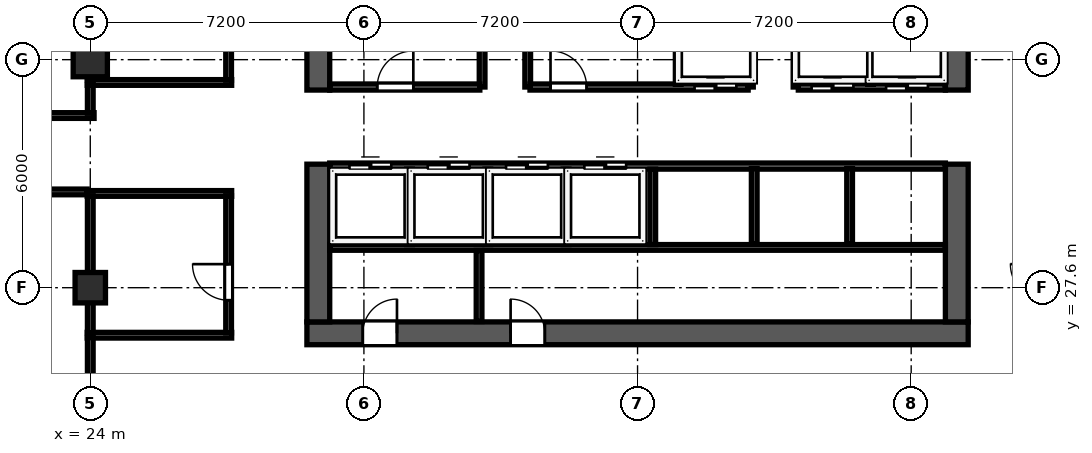
"""IFC4 building model, lengths in metres.
Left out: names, types, materials, properties, quantities, classifications, styles, units other than length and angle.
Written with IfcOpenShell. Run it as: python <this file> out.ifc"""

import sys

from ifc_helpers import new_model, si_unit, direction, frame, frame_2d, origin, origin_2d, place, context, subcontext, project, spatial, rectangle, hollow_rectangle, extrude, element, fill, save


model = new_model("IFC4")
c1 = context("Model", 3, precision=1e-05, world=origin(), true_north=direction((0.0, 1.0)))
c2 = subcontext(c1, "Body", "Model", "MODEL_VIEW")
j1 = project(units=[si_unit("LENGTHUNIT", "METRE"), si_unit("PLANEANGLEUNIT", "RADIAN")], contexts=[c1])
p1 = place(None, origin())
s1 = spatial("IfcSite", under=j1, at=p1, CompositionType="ELEMENT")
p2 = place(p1, origin())
s2 = spatial("IfcBuilding", under=s1, at=p2, CompositionType="ELEMENT")
p3 = place(p2, frame((0.0, 0.0, 169.0)))
s3 = spatial("IfcBuildingStorey", under=s2, at=p3, CompositionType="ELEMENT", Elevation=169.0)
p4 = place(p3, frame((29.7, 26.4, 0.0), z_axis=(0.0, 0.0, 1.0), x_axis=(1.0, 0.0, 0.0)))
e1 = element("IfcWall", 1, at=p4, inside=s3, PredefinedType="SHEAR", context=c2, shape_type="SweptSolid", body=[
    extrude(rectangle(XDim=17.4, YDim=0.6, at=frame_2d((8.7, 0.0))), origin(), (0.0, 0.0, 1.0), 3.62),
])
p5 = place(p4, frame((2.37, 0.0, 0.0), z_axis=(0.0, 0.0, 1.0), x_axis=(-1.0, 0.0, 0.0)))
e2 = element("IfcOpeningElement", 2, at=p5, cuts=e1, PredefinedType="OPENING", context=c2, shape_type="SweptSolid", body=[
    extrude(rectangle(XDim=0.9, YDim=2.1, at=frame_2d((0.45, 1.05))), frame((0.0, 0.31, 0.0), z_axis=(0.0, -1.0, 0.0), x_axis=(1.0, 0.0, 0.0)), (0.0, 0.0, 1.0), 0.62),
])
p6 = place(p4, frame((6.26, 0.0, 0.0), z_axis=(0.0, 0.0, 1.0), x_axis=(-1.0, 0.0, 0.0)))
e3 = element("IfcOpeningElement", 3, at=p6, cuts=e1, PredefinedType="OPENING", context=c2, shape_type="SweptSolid", body=[
    extrude(rectangle(XDim=0.9, YDim=2.1, at=frame_2d((0.45, 1.05))), frame((0.0, 0.31, 0.0), z_axis=(0.0, -1.0, 0.0), x_axis=(1.0, 0.0, 0.0)), (0.0, 0.0, 1.0), 0.62),
])
p7 = place(p3, frame((30.0, 26.7, 0.0), z_axis=(0.0, 0.0, 1.0), x_axis=(0.0, 1.0, 0.0)))
e4 = element("IfcWall", 4, at=p7, inside=s3, PredefinedType="SHEAR", context=c2, shape_type="SweptSolid", body=[
    extrude(rectangle(XDim=4.15, YDim=0.6, at=frame_2d((2.075, 0.0))), origin(), (0.0, 0.0, 1.0), 3.62),
])
p8 = place(p3, frame((30.0, 32.8, 0.0), z_axis=(0.0, 0.0, 1.0), x_axis=(0.0, 1.0, 0.0)))
e5 = element("IfcWall", 5, at=p8, inside=s3, PredefinedType="SHEAR", context=c2, shape_type="SweptSolid", body=[
    extrude(rectangle(XDim=10.1, YDim=0.6, at=frame_2d((5.05, 0.0))), origin(), (0.0, 0.0, 1.0), 3.62),
])
p9 = place(p3, frame((46.8, 26.7, 0.0), z_axis=(0.0, 0.0, 1.0), x_axis=(0.0, 1.0, 0.0)))
e6 = element("IfcWall", 6, at=p9, inside=s3, PredefinedType="SHEAR", context=c2, shape_type="SweptSolid", body=[
    extrude(rectangle(XDim=4.15, YDim=0.6, at=frame_2d((2.075, 0.0))), origin(), (0.0, 0.0, 1.0), 3.62),
])
p10 = place(p3, frame((46.8, 32.8, 0.0), z_axis=(0.0, 0.0, 1.0), x_axis=(0.0, 1.0, 0.0)))
e7 = element("IfcWall", 7, at=p10, inside=s3, PredefinedType="SHEAR", context=c2, shape_type="SweptSolid", body=[
    extrude(rectangle(XDim=10.1, YDim=0.6, at=frame_2d((5.05, 0.0))), origin(), (0.0, 0.0, 1.0), 3.62),
])
p11 = place(p3, frame((24.0, 33.6, 0.0), z_axis=(0.0, 0.0, 1.0), x_axis=(1.0, 0.0, 0.0)))
e8 = element("IfcColumn", 8, at=p11, inside=s3, PredefinedType="COLUMN", context=c2, shape_type="SweptSolid", body=[
    extrude(hollow_rectangle(XDim=0.9, YDim=0.9, WallThickness=0.034, at=origin_2d()), origin(), (0.0, 0.0, 1.0), 3.8),
])
p12 = place(p3, frame((24.0, 27.6, 0.0), z_axis=(0.0, 0.0, 1.0), x_axis=(1.0, 0.0, 0.0)))
e9 = element("IfcColumn", 9, at=p12, inside=s3, PredefinedType="COLUMN", context=c2, shape_type="SweptSolid", body=[
    extrude(hollow_rectangle(XDim=0.8, YDim=0.8, WallThickness=0.03, at=origin_2d()), origin(), (0.0, 0.0, 1.0), 3.8),
])
for number, where, z_axis, x_axis in (
    (10, (34.31, 32.88, 0.0), (0.0, 0.0, 1.0), (0.0, 1.0, 0.0)),
    (11, (35.51, 32.88, 0.0), (0.0, 0.0, 1.0), (0.0, 1.0, 0.0)),
    (12, (41.37, 32.88, 0.0), (0.0, 0.0, 1.0), (0.0, 1.0, 0.0)),
    (13, (42.57, 32.88, 0.0), (0.0, 0.0, 1.0), (0.0, 1.0, 0.0)),
):
    element("IfcWall", number, at=place(p3, frame(where, z_axis=z_axis, x_axis=x_axis)), inside=s3, PredefinedType="SOLIDWALL", context=c2, shape_type="SweptSolid", body=[
        extrude(rectangle(XDim=2.17, YDim=0.15, at=frame_2d((1.085, 0.0))), origin(), (0.0, 0.0, 1.0), 3.62),
    ])
p13 = place(p3, frame((30.3, 32.88, 0.0), z_axis=(0.0, 0.0, 1.0), x_axis=(1.0, 0.0, 0.0)))
e14 = element("IfcWall", 14, at=p13, inside=s3, PredefinedType="SOLIDWALL", context=c2, shape_type="SweptSolid", body=[
    extrude(rectangle(XDim=3.95, YDim=0.16, at=frame_2d((1.975, 0.0))), origin(), (0.0, 0.0, 1.0), 3.62),
])
p14 = place(p13, frame((2.2, 0.0, 0.0), z_axis=(0.0, 0.0, 1.0), x_axis=(-1.0, 0.0, 0.0)))
e15 = element("IfcOpeningElement", 15, at=p14, cuts=e14, PredefinedType="OPENING", context=c2, shape_type="SweptSolid", body=[
    extrude(rectangle(XDim=0.95, YDim=2.12, at=frame_2d((0.475, 1.06))), frame((0.0, 0.09, 0.0), z_axis=(0.0, -1.0, 0.0), x_axis=(1.0, 0.0, 0.0)), (0.0, 0.0, 1.0), 0.18),
])
p15 = place(p3, frame((35.57, 32.88, 0.0), z_axis=(0.0, 0.0, 1.0), x_axis=(1.0, 0.0, 0.0)))
e16 = element("IfcWall", 16, at=p15, inside=s3, PredefinedType="SOLIDWALL", context=c2, shape_type="SweptSolid", body=[
    extrude(rectangle(XDim=5.74, YDim=0.16, at=frame_2d((2.87, 0.0))), origin(), (0.0, 0.0, 1.0), 3.62),
])
p16 = place(p15, frame((1.49, 0.0, 0.0), z_axis=(0.0, 0.0, 1.0), x_axis=(-1.0, 0.0, 0.0)))
e17 = element("IfcOpeningElement", 17, at=p16, cuts=e16, PredefinedType="OPENING", context=c2, shape_type="SweptSolid", body=[
    extrude(rectangle(XDim=0.95, YDim=2.12, at=frame_2d((0.475, 1.06))), frame((0.0, 0.09, 0.0), z_axis=(0.0, -1.0, 0.0), x_axis=(1.0, 0.0, 0.0)), (0.0, 0.0, 1.0), 0.18),
])
p17 = place(p15, frame((5.43, 0.0, 0.0), z_axis=(0.0, 0.0, 1.0), x_axis=(-1.0, 0.0, 0.0)))
e18 = element("IfcOpeningElement", 18, at=p17, cuts=e16, PredefinedType="OPENING", context=c2, shape_type="SweptSolid", body=[
    extrude(rectangle(XDim=1.1, YDim=2.2, at=frame_2d((0.55, 1.1))), frame((0.0, 0.09, 0.0), z_axis=(0.0, -1.0, 0.0), x_axis=(1.0, 0.0, 0.0)), (0.0, 0.0, 1.0), 0.18),
])
p18 = place(p3, frame((42.63, 32.88, 0.0), z_axis=(0.0, 0.0, 1.0), x_axis=(1.0, 0.0, 0.0)))
e19 = element("IfcWall", 19, at=p18, inside=s3, PredefinedType="SOLIDWALL", context=c2, shape_type="SweptSolid", body=[
    extrude(rectangle(XDim=3.87, YDim=0.16, at=frame_2d((1.935, 0.0))), origin(), (0.0, 0.0, 1.0), 3.62),
])
p19 = place(p18, frame((1.45, 0.0, 0.0), z_axis=(0.0, 0.0, 1.0), x_axis=(-1.0, 0.0, 0.0)))
e20 = element("IfcOpeningElement", 20, at=p19, cuts=e19, PredefinedType="OPENING", context=c2, shape_type="SweptSolid", body=[
    extrude(rectangle(XDim=1.1, YDim=2.2, at=frame_2d((0.55, 1.1))), frame((0.0, 0.09, 0.0), z_axis=(0.0, -1.0, 0.0), x_axis=(1.0, 0.0, 0.0)), (0.0, 0.0, 1.0), 0.18),
])
p20 = place(p18, frame((3.41, 0.0, 0.0), z_axis=(0.0, 0.0, 1.0), x_axis=(-1.0, 0.0, 0.0)))
e21 = element("IfcOpeningElement", 21, at=p20, cuts=e19, PredefinedType="OPENING", context=c2, shape_type="SweptSolid", body=[
    extrude(rectangle(XDim=1.1, YDim=2.2, at=frame_2d((0.55, 1.1))), frame((0.0, 0.09, 0.0), z_axis=(0.0, -1.0, 0.0), x_axis=(1.0, 0.0, 0.0)), (0.0, 0.0, 1.0), 0.18),
])
for number, where, z_axis, x_axis in (
    (22, (39.47, 32.95, 0.0), (0.0, 0.0, 1.0), (0.0, 1.0, 0.0)),
    (23, (44.53, 32.95, 0.0), (0.0, 0.0, 1.0), (0.0, 1.0, 0.0)),
):
    element("IfcWall", number, at=place(p3, frame(where, z_axis=z_axis, x_axis=x_axis)), inside=s3, PredefinedType="SOLIDWALL", context=c2, shape_type="SweptSolid", body=[
        extrude(rectangle(XDim=2.05, YDim=0.15, at=frame_2d((1.025, 0.0))), origin(), (0.0, 0.0, 1.0), 3.62),
    ])
p21 = place(p3, frame((30.3, 30.8, 0.0), z_axis=(0.0, 0.0, 1.0), x_axis=(1.0, 0.0, 0.0)))
e24 = element("IfcWall", 24, at=p21, inside=s3, PredefinedType="SOLIDWALL", context=c2, shape_type="SweptSolid", body=[
    extrude(rectangle(XDim=16.2, YDim=0.16, at=frame_2d((8.1, 0.0))), origin(), (0.0, 0.0, 1.0), 3.62),
])
p22 = place(p21, frame((0.52, 0.0, 0.0)))
e25 = element("IfcOpeningElement", 25, at=p22, cuts=e24, PredefinedType="OPENING", context=c2, shape_type="SweptSolid", body=[
    extrude(rectangle(XDim=1.1, YDim=2.2, at=frame_2d((0.55, 1.1))), frame((0.0, 0.09, 0.0), z_axis=(0.0, -1.0, 0.0), x_axis=(1.0, 0.0, 0.0)), (0.0, 0.0, 1.0), 0.18),
])
p23 = place(p21, frame((2.58, 0.0, 0.0)))
e26 = element("IfcOpeningElement", 26, at=p23, cuts=e24, PredefinedType="OPENING", context=c2, shape_type="SweptSolid", body=[
    extrude(rectangle(XDim=1.1, YDim=2.2, at=frame_2d((0.55, 1.1))), frame((0.0, 0.09, 0.0), z_axis=(0.0, -1.0, 0.0), x_axis=(1.0, 0.0, 0.0)), (0.0, 0.0, 1.0), 0.18),
])
p24 = place(p21, frame((4.64, 0.0, 0.0)))
e27 = element("IfcOpeningElement", 27, at=p24, cuts=e24, PredefinedType="OPENING", context=c2, shape_type="SweptSolid", body=[
    extrude(rectangle(XDim=1.1, YDim=2.2, at=frame_2d((0.55, 1.1))), frame((0.0, 0.09, 0.0), z_axis=(0.0, -1.0, 0.0), x_axis=(1.0, 0.0, 0.0)), (0.0, 0.0, 1.0), 0.18),
])
p25 = place(p21, frame((6.7, 0.0, 0.0)))
e28 = element("IfcOpeningElement", 28, at=p25, cuts=e24, PredefinedType="OPENING", context=c2, shape_type="SweptSolid", body=[
    extrude(rectangle(XDim=1.1, YDim=2.2, at=frame_2d((0.55, 1.1))), frame((0.0, 0.09, 0.0), z_axis=(0.0, -1.0, 0.0), x_axis=(1.0, 0.0, 0.0)), (0.0, 0.0, 1.0), 0.18),
])
p26 = place(p3, frame((30.3, 28.66, 0.0), z_axis=(0.0, 0.0, 1.0), x_axis=(1.0, 0.0, 0.0)))
e29 = element("IfcWall", 29, at=p26, inside=s3, PredefinedType="PARTITIONING", context=c2, shape_type="SweptSolid", body=[
    extrude(rectangle(XDim=16.2, YDim=0.15, at=frame_2d((8.1, 0.0))), origin(), (0.0, 0.0, 1.0), 3.62),
])
for number, where, z_axis, x_axis in (
    (30, (32.4, 28.735, 0.0), (0.0, 0.0, 1.0), (0.0, 1.0, 0.0)),
    (31, (34.46, 28.735, 0.0), (0.0, 0.0, 1.0), (0.0, 1.0, 0.0)),
    (32, (36.52, 28.735, 0.0), (0.0, 0.0, 1.0), (0.0, 1.0, 0.0)),
    (33, (38.8, 28.735, 0.0), (0.0, 0.0, 1.0), (0.0, 1.0, 0.0)),
):
    element("IfcWall", number, at=place(p3, frame(where, z_axis=z_axis, x_axis=x_axis)), inside=s3, PredefinedType="SOLIDWALL", context=c2, shape_type="SweptSolid", body=[
        extrude(rectangle(XDim=1.985, YDim=0.15, at=frame_2d((0.992, 0.0))), origin(), (0.0, 0.0, 1.0), 3.62),
    ])
p27 = place(p3, frame((34.23, 26.71, 0.0), z_axis=(0.0, 0.0, 1.0), x_axis=(0.0, 1.0, 0.0)))
e34 = element("IfcWall", 34, at=p27, inside=s3, PredefinedType="PARTITIONING", context=c2, shape_type="SweptSolid", body=[
    extrude(rectangle(XDim=1.87, YDim=0.15, at=frame_2d((0.935, 0.0))), origin(), (0.0, 0.0, 1.0), 3.62),
])
for number, where, z_axis, x_axis in (
    (35, (41.47, 28.75, 0.0), (0.0, 0.0, 1.0), (0.0, 1.0, 0.0)),
    (36, (43.98, 28.75, 0.0), (0.0, 0.0, 1.0), (0.0, 1.0, 0.0)),
):
    element("IfcWall", number, at=place(p3, frame(where, z_axis=z_axis, x_axis=x_axis)), inside=s3, PredefinedType="SOLIDWALL", context=c2, shape_type="SweptSolid", body=[
        extrude(rectangle(XDim=1.985, YDim=0.15, at=frame_2d((0.993, 0.0))), origin(), (0.0, 0.0, 1.0), 3.62),
    ])
p28 = place(p3, frame((23.92, 33.0, 0.0), z_axis=(0.0, 0.0, 1.0), x_axis=(1.0, 0.0, 0.0)))
e37 = element("IfcWall", 37, at=p28, inside=s3, PredefinedType="PARTITIONING", context=c2, shape_type="SweptSolid", body=[
    extrude(rectangle(XDim=3.8, YDim=0.15, at=frame_2d((1.9, 0.0))), origin(), (0.0, 0.0, 1.0), 3.62),
])
p29 = place(p3, frame((24.0, 33.06, 0.0), z_axis=(0.0, 0.0, 1.0), x_axis=(0.0, 1.0, 0.0)))
e38 = element("IfcWall", 38, at=p29, inside=s3, PredefinedType="PARTITIONING", context=c2, shape_type="SweptSolid", body=[
    extrude(rectangle(XDim=5.08, YDim=0.15, at=frame_2d((2.54, 0.0))), origin(), (0.0, 0.0, 1.0), 3.215),
])
p30 = place(p3, frame((27.64, 33.06, 0.0), z_axis=(0.0, 0.0, 1.0), x_axis=(0.0, 1.0, 0.0)))
e39 = element("IfcWall", 39, at=p30, inside=s3, PredefinedType="PARTITIONING", context=c2, shape_type="SweptSolid", body=[
    extrude(rectangle(XDim=5.08, YDim=0.15, at=frame_2d((2.54, 0.0))), origin(), (0.0, 0.0, 1.0), 3.62),
])
p31 = place(p30, frame((2.41, 0.0, 0.0), z_axis=(0.0, 0.0, 1.0), x_axis=(-1.0, 0.0, 0.0)))
e40 = element("IfcOpeningElement", 40, at=p31, cuts=e39, PredefinedType="OPENING", context=c2, shape_type="SweptSolid", body=[
    extrude(rectangle(XDim=0.95, YDim=2.12, at=frame_2d((0.475, 1.06))), frame((0.0, 0.085, 0.0), z_axis=(0.0, -1.0, 0.0), x_axis=(1.0, 0.0, 0.0)), (0.0, 0.0, 1.0), 0.17),
])
for number, where, z_axis, x_axis in (
    (41, (23.92, 30.08, 0.0), (0.0, 0.0, 1.0), (1.0, 0.0, 0.0)),
    (42, (23.92, 26.35, 0.0), (0.0, 0.0, 1.0), (1.0, 0.0, 0.0)),
):
    element("IfcWall", number, at=place(p3, frame(where, z_axis=z_axis, x_axis=x_axis)), inside=s3, PredefinedType="PARTITIONING", context=c2, shape_type="SweptSolid", body=[
        extrude(rectangle(XDim=3.8, YDim=0.15, at=frame_2d((1.9, 0.0))), origin(), (0.0, 0.0, 1.0), 3.62),
    ])
p32 = place(p3, frame((24.0, 26.41, 0.0), z_axis=(0.0, 0.0, 1.0), x_axis=(0.0, 1.0, 0.0)))
e43 = element("IfcWall", 43, at=p32, inside=s3, PredefinedType="PARTITIONING", context=c2, shape_type="SweptSolid", body=[
    extrude(rectangle(XDim=3.61, YDim=0.15, at=frame_2d((1.805, 0.0))), origin(), (0.0, 0.0, 1.0), 3.215),
])
p33 = place(p3, frame((27.64, 26.41, 0.0), z_axis=(0.0, 0.0, 1.0), x_axis=(0.0, 1.0, 0.0)))
e44 = element("IfcWall", 44, at=p33, inside=s3, PredefinedType="PARTITIONING", context=c2, shape_type="SweptSolid", body=[
    extrude(rectangle(XDim=3.61, YDim=0.15, at=frame_2d((1.805, 0.0))), origin(), (0.0, 0.0, 1.0), 3.62),
])
p34 = place(p33, frame((1.81, 0.0, 0.0), z_axis=(0.0, 0.0, 1.0), x_axis=(-1.0, 0.0, 0.0)))
e45 = element("IfcOpeningElement", 45, at=p34, cuts=e44, PredefinedType="OPENING", context=c2, shape_type="SweptSolid", body=[
    extrude(rectangle(XDim=0.95, YDim=2.12, at=frame_2d((0.475, 1.06))), frame((0.0, 0.085, 0.0), z_axis=(0.0, -1.0, 0.0), x_axis=(1.0, 0.0, 0.0)), (0.0, 0.0, 1.0), 0.17),
])
p35 = place(p3, frame((18.312, 32.13, 0.0), z_axis=(0.0, 0.0, 1.0), x_axis=(1.0, 0.0, 0.0)))
e46 = element("IfcWall", 46, at=p35, inside=s3, PredefinedType="PARTITIONING", context=c2, shape_type="SweptSolid", body=[
    extrude(rectangle(XDim=5.788, YDim=0.15, at=frame_2d((2.894, 0.0))), origin(), (0.0, 0.0, 1.0), 3.62),
])
p36 = place(p35, frame((0.14, 0.0, 0.0)))
e47 = element("IfcOpeningElement", 47, at=p36, cuts=e46, PredefinedType="OPENING", context=c2, shape_type="SweptSolid", body=[
    extrude(rectangle(XDim=0.95, YDim=2.18, at=frame_2d((0.475, 1.09))), frame((0.0, 0.085, 0.0), z_axis=(0.0, -1.0, 0.0), x_axis=(1.0, 0.0, 0.0)), (0.0, 0.0, 1.0), 0.17),
])
p37 = place(p3, frame((24.0, 32.19, 0.0), z_axis=(0.0, 0.0, 1.0), x_axis=(0.0, 1.0, 0.0)))
e48 = element("IfcWall", 48, at=p37, inside=s3, PredefinedType="PARTITIONING", context=c2, shape_type="SweptSolid", body=[
    extrude(rectangle(XDim=0.75, YDim=0.15, at=frame_2d((0.375, 0.0))), origin(), (0.0, 0.0, 1.0), 3.215),
])
p38 = place(p3, frame((18.312, 30.12, 0.0), z_axis=(0.0, 0.0, 1.0), x_axis=(1.0, 0.0, 0.0)))
e49 = element("IfcWall", 49, at=p38, inside=s3, PredefinedType="PARTITIONING", context=c2, shape_type="SweptSolid", body=[
    extrude(rectangle(XDim=5.606, YDim=0.15, at=frame_2d((2.803, 0.0))), origin(), (0.0, 0.0, 1.0), 3.62),
])
p39 = place(p38, frame((1.09, 0.0, 0.0), z_axis=(0.0, 0.0, 1.0), x_axis=(-1.0, 0.0, 0.0)))
e50 = element("IfcOpeningElement", 50, at=p39, cuts=e49, PredefinedType="OPENING", context=c2, shape_type="SweptSolid", body=[
    extrude(rectangle(XDim=0.95, YDim=2.15, at=frame_2d((0.475, 1.075))), frame((0.0, 0.085, 0.0), z_axis=(0.0, -1.0, 0.0), x_axis=(1.0, 0.0, 0.0)), (0.0, 0.0, 1.0), 0.17),
])
p40 = place(p3, frame((24.0, 24.28, 0.0), z_axis=(0.0, 0.0, 1.0), x_axis=(0.0, 1.0, 0.0)))
e51 = element("IfcWall", 51, at=p40, inside=s3, PredefinedType="PARTITIONING", context=c2, shape_type="SweptSolid", body=[
    extrude(rectangle(XDim=2.01, YDim=0.15, at=frame_2d((1.005, 0.0))), origin(), (0.0, 0.0, 1.0), 3.215),
])
p41 = place(p14, origin())
e52 = element("IfcDoor", 52, at=p41, inside=s3, OperationType="SINGLE_SWING_LEFT", PredefinedType="DOOR", context=c2, shape_type="SweptSolid", body=[
    extrude(rectangle(XDim=0.95, YDim=2.12, at=frame_2d((0.475, 1.06))), frame((0.0, 0.025, 0.0), z_axis=(0.0, -1.0, 0.0), x_axis=(1.0, 0.0, 0.0)), (0.0, 0.0, 1.0), 0.05),
])
fill(e15, e52)
p42 = place(p16, origin())
e53 = element("IfcDoor", 53, at=p42, inside=s3, OperationType="SINGLE_SWING_RIGHT", PredefinedType="DOOR", context=c2, shape_type="SweptSolid", body=[
    extrude(rectangle(XDim=0.95, YDim=2.12, at=frame_2d((0.475, 1.06))), frame((0.0, 0.025, 0.0), z_axis=(0.0, -1.0, 0.0), x_axis=(1.0, 0.0, 0.0)), (0.0, 0.0, 1.0), 0.05),
])
fill(e17, e53)
p43 = place(p17, origin())
e54 = element("IfcDoor", 54, at=p43, inside=s3, OperationType="SLIDING_TO_RIGHT", PredefinedType="DOOR", context=c2, shape_type="SweptSolid", body=[
    extrude(rectangle(XDim=1.1, YDim=2.2, at=frame_2d((0.55, 1.1))), frame((0.0, 0.025, 0.0), z_axis=(0.0, -1.0, 0.0), x_axis=(1.0, 0.0, 0.0)), (0.0, 0.0, 1.0), 0.05),
])
fill(e18, e54)
p44 = place(p19, origin())
e55 = element("IfcDoor", 55, at=p44, inside=s3, OperationType="SLIDING_TO_RIGHT", PredefinedType="DOOR", context=c2, shape_type="SweptSolid", body=[
    extrude(rectangle(XDim=1.1, YDim=2.2, at=frame_2d((0.55, 1.1))), frame((0.0, 0.025, 0.0), z_axis=(0.0, -1.0, 0.0), x_axis=(1.0, 0.0, 0.0)), (0.0, 0.0, 1.0), 0.05),
])
fill(e20, e55)
p45 = place(p20, origin())
e56 = element("IfcDoor", 56, at=p45, inside=s3, OperationType="SLIDING_TO_RIGHT", PredefinedType="DOOR", context=c2, shape_type="SweptSolid", body=[
    extrude(rectangle(XDim=1.1, YDim=2.2, at=frame_2d((0.55, 1.1))), frame((0.0, 0.025, 0.0), z_axis=(0.0, -1.0, 0.0), x_axis=(1.0, 0.0, 0.0)), (0.0, 0.0, 1.0), 0.05),
])
fill(e21, e56)
p46 = place(p22, origin())
e57 = element("IfcDoor", 57, at=p46, inside=s3, OperationType="SLIDING_TO_LEFT", PredefinedType="DOOR", context=c2, shape_type="SweptSolid", body=[
    extrude(rectangle(XDim=1.1, YDim=2.2, at=frame_2d((0.55, 1.1))), frame((0.0, 0.025, 0.0), z_axis=(0.0, -1.0, 0.0), x_axis=(1.0, 0.0, 0.0)), (0.0, 0.0, 1.0), 0.05),
])
fill(e25, e57)
p47 = place(p23, origin())
e58 = element("IfcDoor", 58, at=p47, inside=s3, OperationType="SLIDING_TO_LEFT", PredefinedType="DOOR", context=c2, shape_type="SweptSolid", body=[
    extrude(rectangle(XDim=1.1, YDim=2.2, at=frame_2d((0.55, 1.1))), frame((0.0, 0.025, 0.0), z_axis=(0.0, -1.0, 0.0), x_axis=(1.0, 0.0, 0.0)), (0.0, 0.0, 1.0), 0.05),
])
fill(e26, e58)
p48 = place(p24, origin())
e59 = element("IfcDoor", 59, at=p48, inside=s3, OperationType="SLIDING_TO_LEFT", PredefinedType="DOOR", context=c2, shape_type="SweptSolid", body=[
    extrude(rectangle(XDim=1.1, YDim=2.2, at=frame_2d((0.55, 1.1))), frame((0.0, 0.025, 0.0), z_axis=(0.0, -1.0, 0.0), x_axis=(1.0, 0.0, 0.0)), (0.0, 0.0, 1.0), 0.05),
])
fill(e27, e59)
p49 = place(p25, origin())
e60 = element("IfcDoor", 60, at=p49, inside=s3, OperationType="SLIDING_TO_LEFT", PredefinedType="DOOR", context=c2, shape_type="SweptSolid", body=[
    extrude(rectangle(XDim=1.1, YDim=2.2, at=frame_2d((0.55, 1.1))), frame((0.0, 0.025, 0.0), z_axis=(0.0, -1.0, 0.0), x_axis=(1.0, 0.0, 0.0)), (0.0, 0.0, 1.0), 0.05),
])
fill(e28, e60)
p50 = place(p5, origin())
e61 = element("IfcDoor", 61, at=p50, inside=s3, OperationType="SINGLE_SWING_LEFT", PredefinedType="DOOR", context=c2, shape_type="SweptSolid", body=[
    extrude(rectangle(XDim=0.9, YDim=2.1, at=frame_2d((0.45, 1.05))), frame((0.0, -0.195, 0.0), z_axis=(0.0, -1.0, 0.0), x_axis=(1.0, 0.0, 0.0)), (0.0, 0.0, 1.0), 0.05),
])
fill(e2, e61)
p51 = place(p6, origin())
e62 = element("IfcDoor", 62, at=p51, inside=s3, OperationType="SINGLE_SWING_RIGHT", PredefinedType="DOOR", context=c2, shape_type="SweptSolid", body=[
    extrude(rectangle(XDim=0.9, YDim=2.1, at=frame_2d((0.45, 1.05))), frame((0.0, -0.195, 0.0), z_axis=(0.0, -1.0, 0.0), x_axis=(1.0, 0.0, 0.0)), (0.0, 0.0, 1.0), 0.05),
])
fill(e3, e62)
p52 = place(p34, origin())
e63 = element("IfcDoor", 63, at=p52, inside=s3, OperationType="SINGLE_SWING_LEFT", PredefinedType="DOOR", context=c2, shape_type="SweptSolid", body=[
    extrude(rectangle(XDim=0.95, YDim=2.12, at=frame_2d((0.475, 1.06))), frame((0.0, 0.025, 0.0), z_axis=(0.0, -1.0, 0.0), x_axis=(1.0, 0.0, 0.0)), (0.0, 0.0, 1.0), 0.05),
])
fill(e45, e63)
save(model, sys.argv[1])
